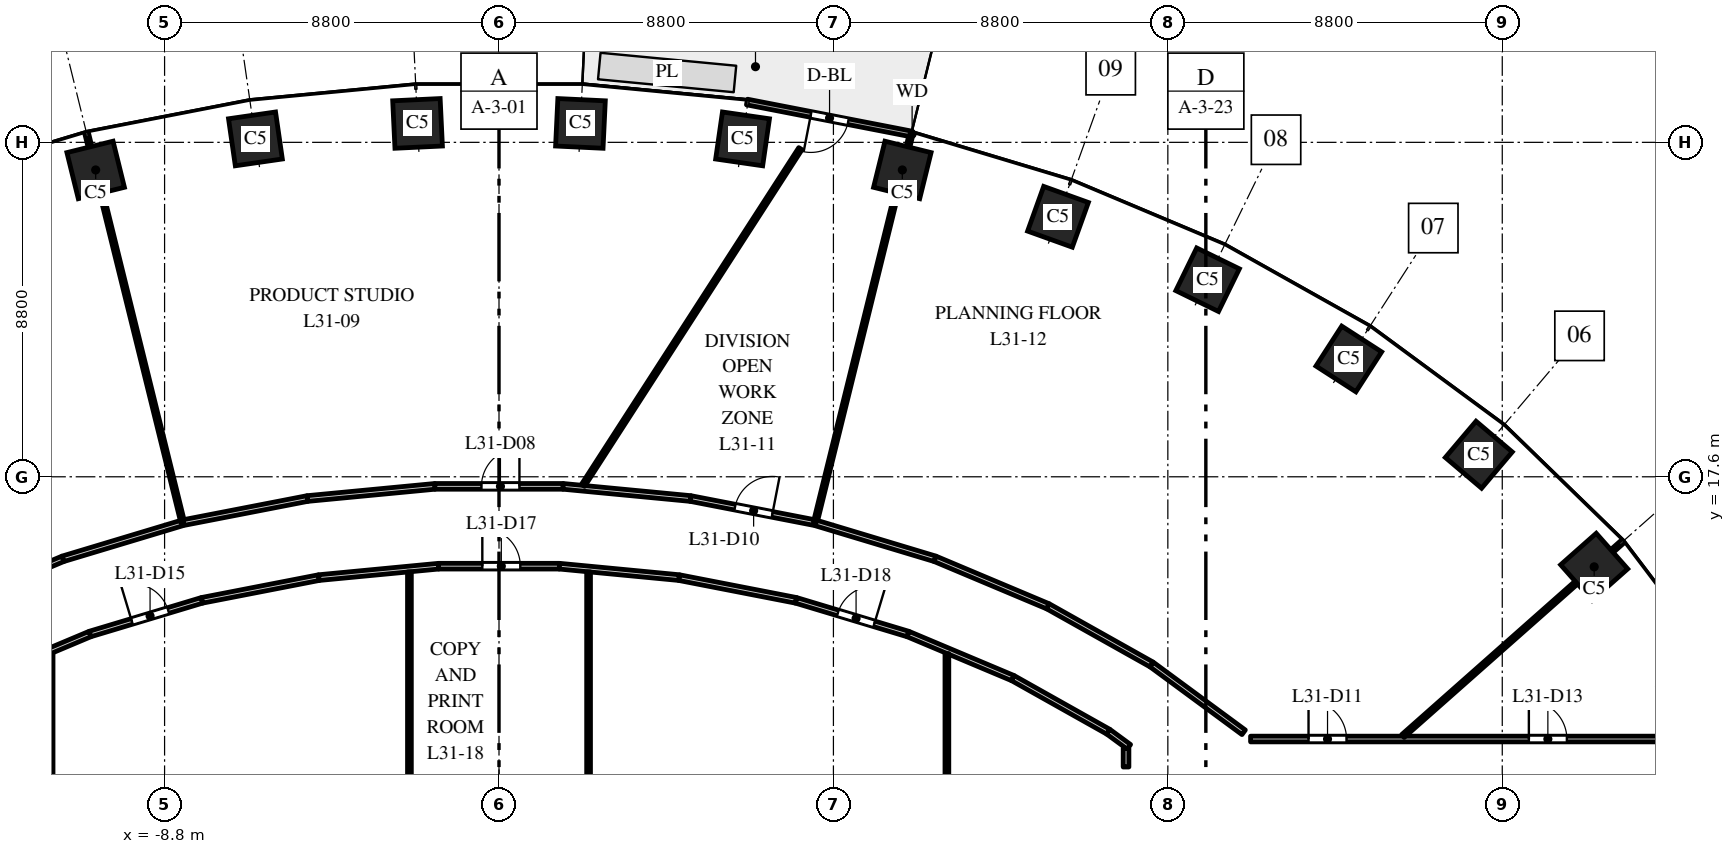
"""IFC4 building model, lengths in metres.
Left out: names, types, materials, properties, quantities, classifications, styles, units other than length and angle.
Written with IfcOpenShell. Run it as: python <this file> out.ifc"""

import sys

from ifc_helpers import new_model, si_unit, direction, frame, frame_2d, origin, origin_2d, place, context, subcontext, project, spatial, rectangle, extrude, element, fill, save


model = new_model("IFC4")
c1 = context("Model", 3, precision=1e-05, world=origin(), true_north=direction((0.0, 1.0)))
c2 = subcontext(c1, "Body", "Model", "MODEL_VIEW")
j1 = project(units=[si_unit("LENGTHUNIT", "METRE"), si_unit("PLANEANGLEUNIT", "RADIAN")], contexts=[c1])
p1 = place(None, origin())
s1 = spatial("IfcSite", under=j1, at=p1, CompositionType="ELEMENT")
p2 = place(p1, origin())
s2 = spatial("IfcBuilding", under=s1, at=p2, CompositionType="ELEMENT")
p3 = place(p2, frame((0.0, 0.0, 136.0)))
s3 = spatial("IfcBuildingStorey", under=s2, at=p3, CompositionType="ELEMENT", Elevation=136.0)
for number, where, z_axis, x_axis in (
    (1, (28.819, 15.23, 0.0), (0.0, 0.0, 1.0), (-0.663, 0.749, 0.0)),
    (2, (25.783, 18.18, 0.0), (0.0, 0.0, 1.0), (-0.763, 0.646, 0.0)),
    (3, (22.362, 20.7, 0.0), (0.0, 0.0, 1.0), (-0.84, 0.542, 0.0)),
    (4, (18.646, 22.785, 0.0), (0.0, 0.0, 1.0), (-0.898, 0.439, 0.0)),
    (5, (14.709, 24.441, 0.0), (0.0, 0.0, 1.0), (-0.941, 0.338, 0.0)),
    (6, (10.613, 25.674, 0.0), (0.0, 0.0, 1.0), (-0.971, 0.24, 0.0)),
    (7, (6.409, 26.491, 0.0), (0.0, 0.0, 1.0), (-0.99, 0.143, 0.0)),
    (8, (2.143, 26.898, 0.0), (0.0, 0.0, 1.0), (-0.999, 0.048, 0.0)),
    (9, (-2.143, 26.898, 0.0), (0.0, 0.0, 1.0), (-0.999, -0.048, 0.0)),
    (10, (-6.409, 26.491, 0.0), (0.0, 0.0, 1.0), (-0.99, -0.143, 0.0)),
    (11, (-10.613, 25.674, 0.0), (0.0, 0.0, 1.0), (-0.971, -0.24, 0.0)),
):
    element("IfcColumn", number, at=place(p3, frame(where, z_axis=z_axis, x_axis=x_axis)), inside=s3, PredefinedType="COLUMN", context=c2, shape_type="SweptSolid", body=[
        extrude(rectangle(XDim=1.25, YDim=1.25, at=origin_2d()), origin(), (0.0, 0.0, 1.0), 4.0),
    ])
p4 = place(p3, frame((10.871, 26.617, 0.0), z_axis=(0.0, 0.0, 1.0), x_axis=(-0.981631174778, 0.190788460615, 0.0)))
e12 = element("IfcWall", 12, at=p4, inside=s3, PredefinedType="STANDARD", context=c2, shape_type="SweptSolid", body=[
    extrude(rectangle(XDim=4.426, YDim=0.15, at=frame_2d((2.213, 0.0))), origin(), (0.0, 0.0, 1.0), 3.7),
])
p5 = place(p4, frame((1.713, 0.0, 0.0)))
e13 = element("IfcOpeningElement", 13, at=p5, cuts=e12, PredefinedType="OPENING", context=c2, shape_type="SweptSolid", body=[
    extrude(rectangle(XDim=1.0, YDim=2.4, at=frame_2d((0.5, 1.2))), frame((0.0, 0.085, 0.0), z_axis=(0.0, -1.0, 0.0), x_axis=(1.0, 0.0, 0.0)), (0.0, 0.0, 1.0), 0.17),
])
p6 = place(p3, frame((-14.445, 14.192, 0.0), z_axis=(0.0, 0.0, 1.0), x_axis=(0.921794929211, 0.387677841101, 0.0)))
e14 = element("IfcWall", 14, at=p6, inside=s3, PredefinedType="PARTITIONING", context=c2, shape_type="SweptSolid", body=[
    extrude(rectangle(XDim=3.224, YDim=0.15, at=frame_2d((1.612, 0.0))), origin(), (0.0, 0.0, 1.0), 2.85),
])
p7 = place(p3, frame((-13.521, 12.303, 0.0), z_axis=(0.0, 0.0, 1.0), x_axis=(0.921848667289, 0.387550041438, 0.0)))
e15 = element("IfcWall", 15, at=p7, inside=s3, PredefinedType="PARTITIONING", context=c2, shape_type="SweptSolid", body=[
    extrude(rectangle(XDim=2.993, YDim=0.15, at=frame_2d((1.497, 0.0))), origin(), (0.0, 0.0, 1.0), 2.85),
])
p8 = place(p3, frame((-11.786, -12.947, 0.0), z_axis=(0.0, 0.0, 1.0), x_axis=(0.0, 1.0, 0.0)))
e16 = element("IfcWall", 16, at=p8, inside=s3, PredefinedType="PARTITIONING", context=c2, shape_type="SweptSolid", body=[
    extrude(rectangle(XDim=25.894, YDim=0.1, at=frame_2d((12.947, 0.0))), origin(), (0.0, 0.0, 1.0), 2.75),
])
p9 = place(p3, frame((-11.473, 15.442, 0.0), z_axis=(0.0, 0.0, 1.0), x_axis=(0.957575426962, 0.288182757429, 0.0)))
e17 = element("IfcWall", 17, at=p9, inside=s3, PredefinedType="PARTITIONING", context=c2, shape_type="SweptSolid", body=[
    extrude(rectangle(XDim=3.273, YDim=0.15, at=frame_2d((1.636, 0.0))), origin(), (0.0, 0.0, 1.0), 3.7),
])
p10 = place(p3, frame((-10.853, 26.646, 0.0), z_axis=(0.0, 0.0, 1.0), x_axis=(0.239771193985, -0.970829426076, 0.0)))
e18 = element("IfcWall", 18, at=p10, inside=s3, PredefinedType="PARTITIONING", context=c2, shape_type="SweptSolid", body=[
    extrude(rectangle(XDim=10.56, YDim=0.1, at=frame_2d((5.28, 0.0))), origin(), (0.0, 0.0, 1.0), 2.85),
])
p11 = place(p3, frame((-10.762, 13.463, 0.0), z_axis=(0.0, 0.0, 1.0), x_axis=(0.957609782402, 0.288068576292, 0.0)))
e19 = element("IfcWall", 19, at=p11, inside=s3, PredefinedType="PARTITIONING", context=c2, shape_type="SweptSolid", body=[
    extrude(rectangle(XDim=3.076, YDim=0.15, at=frame_2d((1.538, 0.0))), origin(), (0.0, 0.0, 1.0), 3.7),
])
p12 = place(p11, frame((1.15, 0.0, 0.0)))
e20 = element("IfcOpeningElement", 20, at=p12, cuts=e19, PredefinedType="OPENING", context=c2, shape_type="SweptSolid", body=[
    extrude(rectangle(XDim=1.0, YDim=2.1, at=frame_2d((0.5, 1.05))), frame((0.0, 0.085, 0.0), z_axis=(0.0, -1.0, 0.0), x_axis=(1.0, 0.0, 0.0)), (0.0, 0.0, 1.0), 0.17),
])
p13 = place(p3, frame((-8.301, 16.395, 0.0), z_axis=(0.0, 0.0, 1.0), x_axis=(0.98166242116, 0.19062762361, 0.0)))
e21 = element("IfcWall", 21, at=p13, inside=s3, PredefinedType="PARTITIONING", context=c2, shape_type="SweptSolid", body=[
    extrude(rectangle(XDim=3.321, YDim=0.15, at=frame_2d((1.66, 0.0))), origin(), (0.0, 0.0, 1.0), 2.85),
])
p14 = place(p3, frame((-7.816, 14.349, 0.0), z_axis=(0.0, 0.0, 1.0), x_axis=(0.981627147181, 0.190809181955, 0.0)))
e22 = element("IfcWall", 22, at=p14, inside=s3, PredefinedType="PARTITIONING", context=c2, shape_type="SweptSolid", body=[
    extrude(rectangle(XDim=3.134, YDim=0.15, at=frame_2d((1.567, 0.0))), origin(), (0.0, 0.0, 1.0), 2.85),
])
p15 = place(p3, frame((-5.041, 17.028, 0.0), z_axis=(0.0, 0.0, 1.0), x_axis=(0.99548178004, 0.094952754613, 0.0)))
e23 = element("IfcWall", 23, at=p15, inside=s3, PredefinedType="PARTITIONING", context=c2, shape_type="SweptSolid", body=[
    extrude(rectangle(XDim=3.368, YDim=0.15, at=frame_2d((1.684, 0.0))), origin(), (0.0, 0.0, 1.0), 3.7),
])
p16 = place(p3, frame((-4.74, 14.947, 0.0), z_axis=(0.0, 0.0, 1.0), x_axis=(0.995467349369, 0.095103923894, 0.0)))
e24 = element("IfcWall", 24, at=p16, inside=s3, PredefinedType="PARTITIONING", context=c2, shape_type="SweptSolid", body=[
    extrude(rectangle(XDim=3.165, YDim=0.15, at=frame_2d((1.583, 0.0))), origin(), (0.0, 0.0, 1.0), 3.7),
])
p17 = place(p3, frame((-2.357, 7.21, 0.0), z_axis=(0.0, 0.0, 1.0), x_axis=(0.0, 1.0, 0.0)))
e25 = element("IfcWall", 25, at=p17, inside=s3, PredefinedType="PARTITIONING", context=c2, shape_type="SweptSolid", body=[
    extrude(rectangle(XDim=7.886, YDim=0.1, at=frame_2d((3.943, 0.0))), origin(), (0.0, 0.0, 1.0), 2.9),
])
p18 = place(p3, frame((-1.688, 17.348, 0.0), z_axis=(0.0, 0.0, 1.0), x_axis=(1.0, 0.0, 0.0)))
e26 = element("IfcWall", 26, at=p18, inside=s3, PredefinedType="PARTITIONING", context=c2, shape_type="SweptSolid", body=[
    extrude(rectangle(XDim=3.376, YDim=0.15, at=frame_2d((1.688, 0.0))), origin(), (0.0, 0.0, 1.0), 2.85),
])
p19 = place(p18, frame((1.226, 0.0, 0.0)))
e27 = element("IfcOpeningElement", 27, at=p19, cuts=e26, PredefinedType="OPENING", context=c2, shape_type="SweptSolid", body=[
    extrude(rectangle(XDim=1.0, YDim=2.1, at=frame_2d((0.5, 1.05))), frame((0.0, 0.085, 0.0), z_axis=(0.0, -1.0, 0.0), x_axis=(1.0, 0.0, 0.0)), (0.0, 0.0, 1.0), 0.17),
])
p20 = place(p3, frame((-1.589, 15.248, 0.0), z_axis=(0.0, 0.0, 1.0), x_axis=(1.0, 0.0, 0.0)))
e28 = element("IfcWall", 28, at=p20, inside=s3, PredefinedType="PARTITIONING", context=c2, shape_type="SweptSolid", body=[
    extrude(rectangle(XDim=3.178, YDim=0.15, at=frame_2d((1.589, 0.0))), origin(), (0.0, 0.0, 1.0), 2.85),
])
p21 = place(p20, frame((1.15, 0.0, 0.0)))
e29 = element("IfcOpeningElement", 29, at=p21, cuts=e28, PredefinedType="OPENING", context=c2, shape_type="SweptSolid", body=[
    extrude(rectangle(XDim=1.0, YDim=2.1, at=frame_2d((0.5, 1.05))), frame((0.0, 0.085, 0.0), z_axis=(0.0, -1.0, 0.0), x_axis=(1.0, 0.0, 0.0)), (0.0, 0.0, 1.0), 0.17),
])
p22 = place(p3, frame((1.589, 15.248, 0.0), z_axis=(0.0, 0.0, 1.0), x_axis=(0.995467349369, -0.095103923894, 0.0)))
e30 = element("IfcWall", 30, at=p22, inside=s3, PredefinedType="PARTITIONING", context=c2, shape_type="SweptSolid", body=[
    extrude(rectangle(XDim=3.165, YDim=0.15, at=frame_2d((1.583, 0.0))), origin(), (0.0, 0.0, 1.0), 2.85),
])
p23 = place(p3, frame((1.688, 17.348, 0.0), z_axis=(0.0, 0.0, 1.0), x_axis=(0.99548178004, -0.094952754613, 0.0)))
e31 = element("IfcWall", 31, at=p23, inside=s3, PredefinedType="PARTITIONING", context=c2, shape_type="SweptSolid", body=[
    extrude(rectangle(XDim=3.368, YDim=0.15, at=frame_2d((1.684, 0.0))), origin(), (0.0, 0.0, 1.0), 2.85),
])
p24 = place(p3, frame((2.212, 17.374, 0.0), z_axis=(0.0, 0.0, 1.0), x_axis=(0.542291918101, 0.840190142505, 0.0)))
e32 = element("IfcWall", 32, at=p24, inside=s3, PredefinedType="PARTITIONING", context=c2, shape_type="SweptSolid", body=[
    extrude(rectangle(XDim=10.545, YDim=0.1, at=frame_2d((5.272, 0.0))), origin(), (0.0, 0.0, 1.0), 2.85),
])
p25 = place(p3, frame((2.357, 7.21, 0.0), z_axis=(0.0, 0.0, 1.0), x_axis=(0.0, 1.0, 0.0)))
e33 = element("IfcWall", 33, at=p25, inside=s3, PredefinedType="PARTITIONING", context=c2, shape_type="SweptSolid", body=[
    extrude(rectangle(XDim=7.886, YDim=0.1, at=frame_2d((3.943, 0.0))), origin(), (0.0, 0.0, 1.0), 2.85),
])
p26 = place(p3, frame((4.74, 14.947, 0.0), z_axis=(0.0, 0.0, 1.0), x_axis=(0.981627147181, -0.190809181955, 0.0)))
e34 = element("IfcWall", 34, at=p26, inside=s3, PredefinedType="PARTITIONING", context=c2, shape_type="SweptSolid", body=[
    extrude(rectangle(XDim=3.134, YDim=0.15, at=frame_2d((1.567, 0.0))), origin(), (0.0, 0.0, 1.0), 3.7),
])
p27 = place(p3, frame((5.041, 17.028, 0.0), z_axis=(0.0, 0.0, 1.0), x_axis=(0.98166242116, -0.19062762361, 0.0)))
e35 = element("IfcWall", 35, at=p27, inside=s3, PredefinedType="PARTITIONING", context=c2, shape_type="SweptSolid", body=[
    extrude(rectangle(XDim=3.321, YDim=0.15, at=frame_2d((1.66, 0.0))), origin(), (0.0, 0.0, 1.0), 3.7),
])
p28 = place(p27, frame((1.19, 0.0, 0.0)))
e36 = element("IfcOpeningElement", 36, at=p28, cuts=e35, PredefinedType="OPENING", context=c2, shape_type="SweptSolid", body=[
    extrude(rectangle(XDim=1.0, YDim=2.1, at=frame_2d((0.5, 1.05))), frame((0.0, 0.085, 0.0), z_axis=(0.0, -1.0, 0.0), x_axis=(1.0, 0.0, 0.0)), (0.0, 0.0, 1.0), 0.17),
])
p29 = place(p3, frame((7.816, 14.349, 0.0), z_axis=(0.0, 0.0, 1.0), x_axis=(0.957609782402, -0.288068576292, 0.0)))
e37 = element("IfcWall", 37, at=p29, inside=s3, PredefinedType="PARTITIONING", context=c2, shape_type="SweptSolid", body=[
    extrude(rectangle(XDim=3.076, YDim=0.15, at=frame_2d((1.538, 0.0))), origin(), (0.0, 0.0, 1.0), 2.85),
])
p30 = place(p29, frame((1.15, 0.0, 0.0)))
e38 = element("IfcOpeningElement", 38, at=p30, cuts=e37, PredefinedType="OPENING", context=c2, shape_type="SweptSolid", body=[
    extrude(rectangle(XDim=1.0, YDim=2.1, at=frame_2d((0.5, 1.05))), frame((0.0, 0.085, 0.0), z_axis=(0.0, -1.0, 0.0), x_axis=(1.0, 0.0, 0.0)), (0.0, 0.0, 1.0), 0.17),
])
p31 = place(p3, frame((8.321, 16.394, 0.0), z_axis=(0.0, 0.0, 1.0), x_axis=(0.239771193985, 0.970829426076, 0.0)))
e39 = element("IfcWall", 39, at=p31, inside=s3, PredefinedType="PARTITIONING", context=c2, shape_type="SweptSolid", body=[
    extrude(rectangle(XDim=10.56, YDim=0.1, at=frame_2d((5.28, 0.0))), origin(), (0.0, 0.0, 1.0), 2.9),
])
p32 = place(p3, frame((8.339, 16.385, 0.0), z_axis=(0.0, 0.0, 1.0), x_axis=(0.957575426962, -0.288182757429, 0.0)))
e40 = element("IfcWall", 40, at=p32, inside=s3, PredefinedType="PARTITIONING", context=c2, shape_type="SweptSolid", body=[
    extrude(rectangle(XDim=3.273, YDim=0.15, at=frame_2d((1.636, 0.0))), origin(), (0.0, 0.0, 1.0), 2.85),
])
p33 = place(p3, frame((10.762, 13.463, 0.0), z_axis=(0.0, 0.0, 1.0), x_axis=(0.921848667289, -0.387550041438, 0.0)))
e41 = element("IfcWall", 41, at=p33, inside=s3, PredefinedType="PARTITIONING", context=c2, shape_type="SweptSolid", body=[
    extrude(rectangle(XDim=2.993, YDim=0.15, at=frame_2d((1.497, 0.0))), origin(), (0.0, 0.0, 1.0), 3.7),
])
p34 = place(p3, frame((11.473, 15.442, 0.0), z_axis=(0.0, 0.0, 1.0), x_axis=(0.921794929211, -0.387677841101, 0.0)))
e42 = element("IfcWall", 42, at=p34, inside=s3, PredefinedType="PARTITIONING", context=c2, shape_type="SweptSolid", body=[
    extrude(rectangle(XDim=3.224, YDim=0.15, at=frame_2d((1.612, 0.0))), origin(), (0.0, 0.0, 1.0), 3.7),
])
p35 = place(p3, frame((11.786, -12.947, 0.0), z_axis=(0.0, 0.0, 1.0), x_axis=(0.0, 1.0, 0.0)))
e43 = element("IfcWall", 43, at=p35, inside=s3, PredefinedType="PARTITIONING", context=c2, shape_type="SweptSolid", body=[
    extrude(rectangle(XDim=25.894, YDim=0.1, at=frame_2d((12.947, 0.0))), origin(), (0.0, 0.0, 1.0), 2.75),
])
p36 = place(p3, frame((13.521, 12.303, 0.0), z_axis=(0.0, 0.0, 1.0), x_axis=(0.871948863789, -0.489596955604, 0.0)))
e44 = element("IfcWall", 44, at=p36, inside=s3, PredefinedType="PARTITIONING", context=c2, shape_type="SweptSolid", body=[
    extrude(rectangle(XDim=2.88, YDim=0.15, at=frame_2d((1.44, 0.0))), origin(), (0.0, 0.0, 1.0), 3.7),
])
p37 = place(p3, frame((14.445, 14.192, 0.0), z_axis=(0.0, 0.0, 1.0), x_axis=(0.872054495499, -0.489408783003, 0.0)))
e45 = element("IfcWall", 45, at=p37, inside=s3, PredefinedType="PARTITIONING", context=c2, shape_type="SweptSolid", body=[
    extrude(rectangle(XDim=3.128, YDim=0.15, at=frame_2d((1.564, 0.0))), origin(), (0.0, 0.0, 1.0), 3.7),
])
p38 = place(p3, frame((16.032, 10.893, 0.0), z_axis=(0.0, 0.0, 1.0), x_axis=(0.805701862575, -0.592321288359, 0.0)))
e46 = element("IfcWall", 46, at=p38, inside=s3, PredefinedType="PARTITIONING", context=c2, shape_type="SweptSolid", body=[
    extrude(rectangle(XDim=0.674, YDim=0.15, at=frame_2d((0.337, 0.0))), origin(), (0.0, 0.0, 1.0), 3.7),
])
p39 = place(p3, frame((16.5, 9.964, 0.0), z_axis=(0.0, 0.0, 1.0), x_axis=(0.0, 1.0, 0.0)))
e47 = element("IfcWall", 47, at=p39, inside=s3, PredefinedType="PARTITIONING", context=c2, shape_type="SweptSolid", body=[
    extrude(rectangle(XDim=0.492, YDim=0.15, at=frame_2d((0.246, 0.0))), origin(), (0.0, 0.0, 1.0), 3.7),
])
p40 = place(p3, frame((17.173, 12.661, 0.0), z_axis=(0.0, 0.0, 1.0), x_axis=(0.805151708762, -0.593068904831, 0.0)))
e48 = element("IfcWall", 48, at=p40, inside=s3, PredefinedType="PARTITIONING", context=c2, shape_type="SweptSolid", body=[
    extrude(rectangle(XDim=3.008, YDim=0.15, at=frame_2d((1.504, 0.0))), origin(), (0.0, 0.0, 1.0), 3.7),
])
p41 = place(p3, frame((19.777, 10.7, 0.0), z_axis=(0.0, 0.0, 1.0), x_axis=(1.0, 0.0, 0.0)))
e49 = element("IfcWall", 49, at=p41, inside=s3, PredefinedType="PARTITIONING", context=c2, shape_type="SweptSolid", body=[
    extrude(rectangle(XDim=11.723, YDim=0.15, at=frame_2d((5.861, 0.0))), origin(), (0.0, 0.0, 1.0), 2.75),
])
p42 = place(p41, frame((1.525, 0.0, 0.0)))
e50 = element("IfcOpeningElement", 50, at=p42, cuts=e49, PredefinedType="OPENING", context=c2, shape_type="SweptSolid", body=[
    extrude(rectangle(XDim=1.0, YDim=2.1, at=frame_2d((0.5, 1.05))), frame((0.0, 0.085, 0.0), z_axis=(0.0, -1.0, 0.0), x_axis=(1.0, 0.0, 0.0)), (0.0, 0.0, 1.0), 0.17),
])
p43 = place(p41, frame((7.323, 0.0, 0.0)))
e51 = element("IfcOpeningElement", 51, at=p43, cuts=e49, PredefinedType="OPENING", context=c2, shape_type="SweptSolid", body=[
    extrude(rectangle(XDim=1.0, YDim=2.1, at=frame_2d((0.5, 1.05))), frame((0.0, 0.085, 0.0), z_axis=(0.0, -1.0, 0.0), x_axis=(1.0, 0.0, 0.0)), (0.0, 0.0, 1.0), 0.17),
])
p44 = place(p3, frame((23.785, 10.778, 0.0), z_axis=(0.0, 0.0, 1.0), x_axis=(0.748985701008, 0.662586160198, 0.0)))
e52 = element("IfcWall", 52, at=p44, inside=s3, PredefinedType="PARTITIONING", context=c2, shape_type="SweptSolid", body=[
    extrude(rectangle(XDim=7.723, YDim=0.1, at=frame_2d((3.861, 0.0))), origin(), (0.0, 0.0, 1.0), 3.7),
])
p45 = place(p5, origin())
e53 = element("IfcDoor", 53, at=p45, inside=s3, OperationType="SINGLE_SWING_RIGHT", PredefinedType="DOOR", context=c2, shape_type="SweptSolid", body=[
    extrude(rectangle(XDim=1.0, YDim=2.4, at=frame_2d((0.5, 1.2))), frame((0.0, 0.025, 0.0), z_axis=(0.0, -1.0, 0.0), x_axis=(1.0, 0.0, 0.0)), (0.0, 0.0, 1.0), 0.05),
])
fill(e13, e53)
p46 = place(p19, origin())
e54 = element("IfcDoor", 54, at=p46, inside=s3, OperationType="SINGLE_SWING_RIGHT", PredefinedType="DOOR", context=c2, shape_type="SweptSolid", body=[
    extrude(rectangle(XDim=1.0, YDim=2.1, at=frame_2d((0.5, 1.05))), frame((0.0, 0.025, 0.0), z_axis=(0.0, -1.0, 0.0), x_axis=(1.0, 0.0, 0.0)), (0.0, 0.0, 1.0), 0.05),
])
fill(e27, e54)
p47 = place(p28, origin())
e55 = element("IfcDoor", 55, at=p47, inside=s3, OperationType="SINGLE_SWING_RIGHT", PredefinedType="DOOR", context=c2, shape_type="SweptSolid", body=[
    extrude(rectangle(XDim=1.0, YDim=2.1, at=frame_2d((0.5, 1.05))), frame((0.0, 0.025, 0.0), z_axis=(0.0, -1.0, 0.0), x_axis=(1.0, 0.0, 0.0)), (0.0, 0.0, 1.0), 0.05),
])
fill(e36, e55)
p48 = place(p42, origin())
e56 = element("IfcDoor", 56, at=p48, inside=s3, OperationType="SINGLE_SWING_LEFT", PredefinedType="DOOR", context=c2, shape_type="SweptSolid", body=[
    extrude(rectangle(XDim=1.0, YDim=2.1, at=frame_2d((0.5, 1.05))), frame((0.0, 0.025, 0.0), z_axis=(0.0, -1.0, 0.0), x_axis=(1.0, 0.0, 0.0)), (0.0, 0.0, 1.0), 0.05),
])
fill(e50, e56)
p49 = place(p43, origin())
e57 = element("IfcDoor", 57, at=p49, inside=s3, OperationType="SINGLE_SWING_LEFT", PredefinedType="DOOR", context=c2, shape_type="SweptSolid", body=[
    extrude(rectangle(XDim=1.0, YDim=2.1, at=frame_2d((0.5, 1.05))), frame((0.0, 0.025, 0.0), z_axis=(0.0, -1.0, 0.0), x_axis=(1.0, 0.0, 0.0)), (0.0, 0.0, 1.0), 0.05),
])
fill(e51, e57)
p50 = place(p12, origin())
e58 = element("IfcDoor", 58, at=p50, inside=s3, OperationType="SINGLE_SWING_LEFT", PredefinedType="DOOR", context=c2, shape_type="SweptSolid", body=[
    extrude(rectangle(XDim=1.0, YDim=2.1, at=frame_2d((0.5, 1.05))), frame((0.0, 0.025, 0.0), z_axis=(0.0, -1.0, 0.0), x_axis=(1.0, 0.0, 0.0)), (0.0, 0.0, 1.0), 0.05),
])
fill(e20, e58)
p51 = place(p21, origin())
e59 = element("IfcDoor", 59, at=p51, inside=s3, OperationType="SINGLE_SWING_LEFT", PredefinedType="DOOR", context=c2, shape_type="SweptSolid", body=[
    extrude(rectangle(XDim=1.0, YDim=2.1, at=frame_2d((0.5, 1.05))), frame((0.0, 0.025, 0.0), z_axis=(0.0, -1.0, 0.0), x_axis=(1.0, 0.0, 0.0)), (0.0, 0.0, 1.0), 0.05),
])
fill(e29, e59)
p52 = place(p30, origin())
e60 = element("IfcDoor", 60, at=p52, inside=s3, OperationType="SINGLE_SWING_RIGHT", PredefinedType="DOOR", context=c2, shape_type="SweptSolid", body=[
    extrude(rectangle(XDim=1.0, YDim=2.1, at=frame_2d((0.5, 1.05))), frame((0.0, 0.025, 0.0), z_axis=(0.0, -1.0, 0.0), x_axis=(1.0, 0.0, 0.0)), (0.0, 0.0, 1.0), 0.05),
])
fill(e38, e60)
save(model, sys.argv[1])
